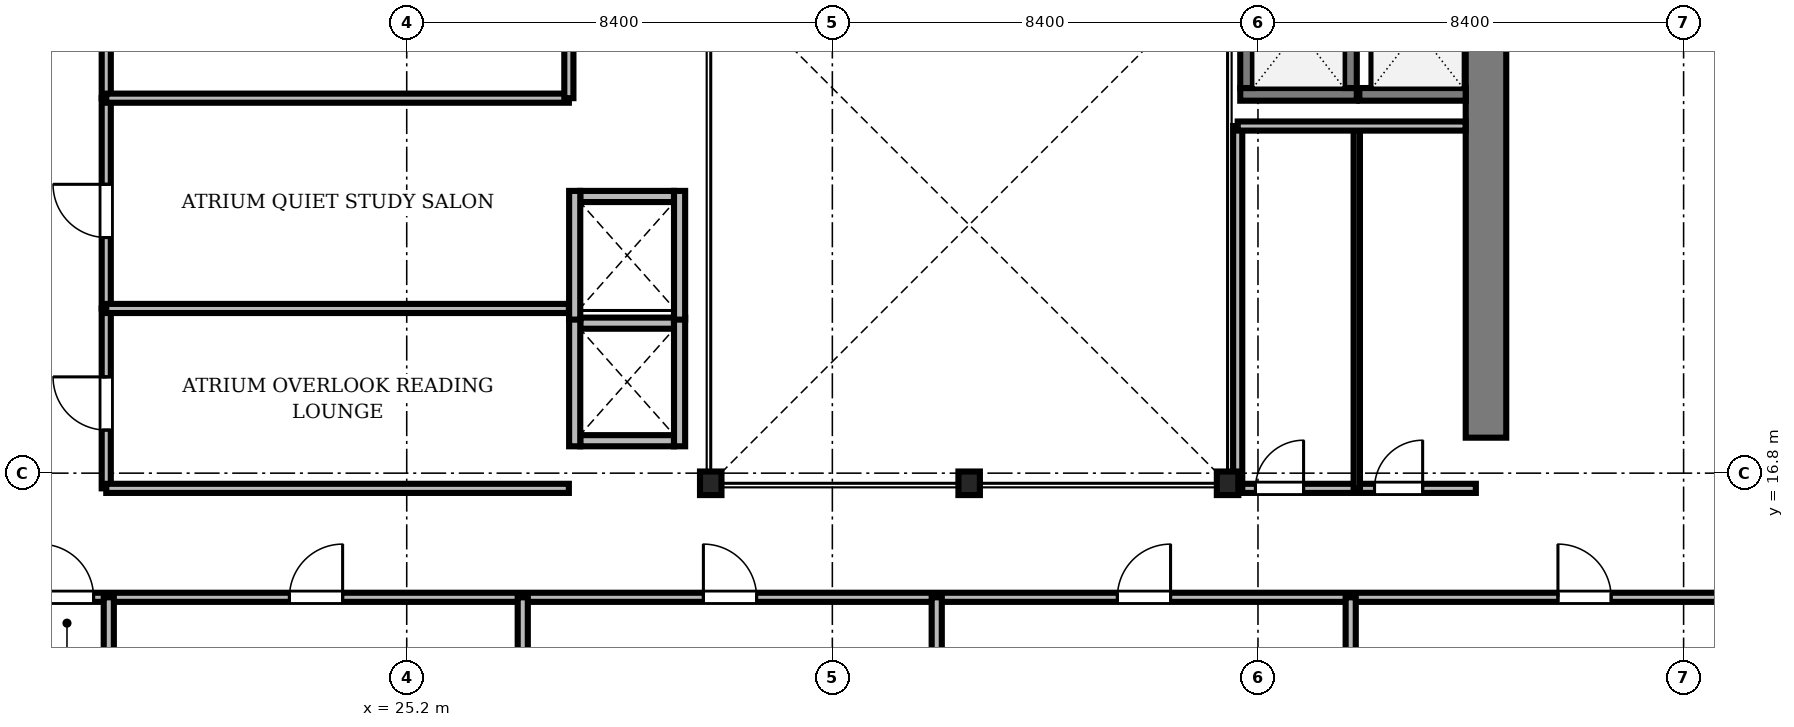
"""IFC4 building model, lengths in metres.
Left out: names, types, materials, properties, quantities, classifications, styles, units other than length and angle.
Written with IfcOpenShell. Run it as: python <this file> out.ifc"""

import sys

from ifc_helpers import new_model, si_unit, direction, frame, frame_2d, origin, origin_2d, place, context, subcontext, project, spatial, rectangle, i_section, extrude, source, transform, mapped, element, fill, save


model = new_model("IFC4")
c1 = context("Model", 3, precision=1e-05, world=origin(), true_north=direction((0.0, 1.0)))
c2 = subcontext(c1, "Body", "Model", "MODEL_VIEW")
j1 = project(units=[si_unit("LENGTHUNIT", "METRE"), si_unit("PLANEANGLEUNIT", "RADIAN")], contexts=[c1])
p1 = place(None, origin())
s1 = spatial("IfcSite", under=j1, at=p1, CompositionType="ELEMENT")
p2 = place(p1, origin())
s2 = spatial("IfcBuilding", under=s1, at=p2, CompositionType="ELEMENT")
p3 = place(p2, frame((0.0, 0.0, 159.4)))
s3 = spatial("IfcBuildingStorey", under=s2, at=p3, CompositionType="ELEMENT", Elevation=159.4)
m1 = source(origin(), c2, "Body", "SweptSolid", [
    extrude(rectangle(XDim=13.15, YDim=0.8, at=frame_2d((6.575, 0.0))), origin(), (0.0, 0.0, 1.0), 3.46),
])
p4 = place(p3, frame((46.5, 17.5, 0.0), z_axis=(0.0, 0.0, 1.0), x_axis=(0.0, 1.0, 0.0)))
e1 = element("IfcWall", 1, at=p4, inside=s3, PredefinedType="SHEAR", context=c2, shape_type="MappedRepresentation", body=[
    mapped(m1, transform((0.0, 0.0, 0.0), scale=1.0)),
])
m2 = source(origin(), c2, "Body", "SweptSolid", [
    extrude(i_section(OverallWidth=0.424, OverallDepth=0.465, WebThickness=0.035, FlangeThickness=0.056, FilletRadius=0.015, at=origin_2d()), origin(), (0.0, 0.0, 1.0), 3.46),
])
for number, where, z_axis, x_axis in (
    (2, (31.2, 16.6, 0.0), (0.0, 0.0, 1.0), (1.0, 0.0, 0.0)),
    (3, (36.3, 16.6, 0.0), (0.0, 0.0, 1.0), (1.0, 0.0, 0.0)),
    (4, (41.4, 16.6, 0.0), (0.0, 0.0, 1.0), (1.0, 0.0, 0.0)),
):
    element("IfcColumn", number, at=place(p3, frame(where, z_axis=z_axis, x_axis=x_axis)), inside=s3, PredefinedType="COLUMN", context=c2, shape_type="MappedRepresentation", body=[
        mapped(m2, transform((0.0, 0.0, 0.0), scale=1.0)),
    ])
m3 = source(origin(), c2, "Body", "SweptSolid", [
    extrude(rectangle(XDim=1.85, YDim=0.22, at=frame_2d((0.925, 0.0))), origin(), (0.0, 0.0, 1.0), 3.46),
])
for number, where, z_axis, x_axis in (
    (5, (28.625, 17.44, 0.0), (0.0, 0.0, 1.0), (1.0, 0.0, 0.0)),
    (6, (28.625, 19.76, 0.0), (0.0, 0.0, 1.0), (1.0, 0.0, 0.0)),
):
    element("IfcWall", number, at=place(p3, frame(where, z_axis=z_axis, x_axis=x_axis)), inside=s3, PredefinedType="SOLIDWALL", context=c2, shape_type="MappedRepresentation", body=[
        mapped(m3, transform((0.0, 0.0, 0.0), scale=1.0)),
    ])
m4 = source(origin(), c2, "Body", "SweptSolid", [
    extrude(rectangle(XDim=2.54, YDim=0.22, at=frame_2d((1.27, 0.0))), origin(), (0.0, 0.0, 1.0), 3.46),
])
for number, where, z_axis, x_axis in (
    (7, (28.515, 17.33, 0.0), (0.0, 0.0, 1.0), (0.0, 1.0, 0.0)),
    (8, (30.585, 17.33, 0.0), (0.0, 0.0, 1.0), (0.0, 1.0, 0.0)),
):
    element("IfcWall", number, at=place(p3, frame(where, z_axis=z_axis, x_axis=x_axis)), inside=s3, PredefinedType="SOLIDWALL", context=c2, shape_type="MappedRepresentation", body=[
        mapped(m4, transform((0.0, 0.0, 0.0), scale=1.0)),
    ])
p5 = place(p3, frame((28.625, 22.26, 0.0), z_axis=(0.0, 0.0, 1.0), x_axis=(1.0, 0.0, 0.0)))
e9 = element("IfcWall", 9, at=p5, inside=s3, PredefinedType="SOLIDWALL", context=c2, shape_type="MappedRepresentation", body=[
    mapped(m3, transform((0.0, 0.0, 0.0), scale=1.0)),
])
for number, where, z_axis, x_axis in (
    (10, (28.515, 19.83, 0.0), (0.0, 0.0, 1.0), (0.0, 1.0, 0.0)),
    (11, (30.585, 19.83, 0.0), (0.0, 0.0, 1.0), (0.0, 1.0, 0.0)),
):
    element("IfcWall", number, at=place(p3, frame(where, z_axis=z_axis, x_axis=x_axis)), inside=s3, PredefinedType="SOLIDWALL", context=c2, shape_type="MappedRepresentation", body=[
        mapped(m4, transform((0.0, 0.0, 0.0), scale=1.0)),
    ])
m5 = source(origin(), c2, "Body", "SweptSolid", [
    extrude(rectangle(XDim=2.3, YDim=0.25, at=frame_2d((1.15, 0.0))), origin(), (0.0, 0.0, 1.0), 3.46),
])
for number, where, z_axis, x_axis in (
    (12, (41.65, 24.275, 0.0), (0.0, 0.0, 1.0), (1.0, 0.0, 0.0)),
    (13, (41.775, 24.4, 0.0), (0.0, 0.0, 1.0), (0.0, 1.0, 0.0)),
    (14, (43.825, 24.4, 0.0), (0.0, 0.0, 1.0), (0.0, 1.0, 0.0)),
):
    element("IfcWall", number, at=place(p3, frame(where, z_axis=z_axis, x_axis=x_axis)), inside=s3, PredefinedType="SOLIDWALL", context=c2, shape_type="MappedRepresentation", body=[
        mapped(m5, transform((0.0, 0.0, 0.0), scale=1.0)),
    ])
m6 = source(origin(), c2, "Body", "SweptSolid", [
    extrude(rectangle(XDim=2.1, YDim=0.25, at=frame_2d((1.05, 0.0))), origin(), (0.0, 0.0, 1.0), 3.46),
])
p6 = place(p3, frame((44.0, 24.275, 0.0), z_axis=(0.0, 0.0, 1.0), x_axis=(1.0, 0.0, 0.0)))
e15 = element("IfcWall", 15, at=p6, inside=s3, PredefinedType="SOLIDWALL", context=c2, shape_type="MappedRepresentation", body=[
    mapped(m6, transform((0.0, 0.0, 0.0), scale=1.0)),
])
m7 = source(origin(), c2, "Body", "SweptSolid", [
    extrude(rectangle(XDim=46.156, YDim=0.18, at=frame_2d((23.078, 0.0))), origin(), (0.0, 0.0, 1.0), 2.702),
])
p7 = place(p3, frame((6.922, 14.35, 0.0), z_axis=(0.0, 0.0, 1.0), x_axis=(1.0, 0.0, 0.0)))
e16 = element("IfcWall", 16, at=p7, inside=s3, PredefinedType="PARTITIONING", context=c2, shape_type="MappedRepresentation", body=[
    mapped(m7, transform((0.0, 0.0, 0.0), scale=1.0)),
])
m8 = source(origin(), c2, "Body", "SweptSolid", [
    extrude(rectangle(XDim=1.05, YDim=2.2, at=frame_2d((0.525, 1.1))), frame((0.0, 0.1, 0.0), z_axis=(0.0, -1.0, 0.0), x_axis=(1.0, 0.0, 0.0)), (0.0, 0.0, 1.0), 0.2),
])
p8 = place(p7, frame((11.048, 0.0, 0.0)))
e17 = element("IfcOpeningElement", 17, at=p8, cuts=e16, PredefinedType="OPENING", context=c2, shape_type="MappedRepresentation", body=[
    mapped(m8, transform((0.0, 0.0, 0.0), scale=1.0)),
])
p9 = place(p7, frame((15.963, 0.0, 0.0)))
e18 = element("IfcOpeningElement", 18, at=p9, cuts=e16, PredefinedType="OPENING", context=c2, shape_type="MappedRepresentation", body=[
    mapped(m8, transform((0.0, 0.0, 0.0), scale=1.0)),
])
p10 = place(p7, frame((24.133, 0.0, 0.0)))
e19 = element("IfcOpeningElement", 19, at=p10, cuts=e16, PredefinedType="OPENING", context=c2, shape_type="MappedRepresentation", body=[
    mapped(m8, transform((0.0, 0.0, 0.0), scale=1.0)),
])
p11 = place(p7, frame((32.303, 0.0, 0.0)))
e20 = element("IfcOpeningElement", 20, at=p11, cuts=e16, PredefinedType="OPENING", context=c2, shape_type="MappedRepresentation", body=[
    mapped(m8, transform((0.0, 0.0, 0.0), scale=1.0)),
])
p12 = place(p7, frame((40.998, 0.0, 0.0)))
e21 = element("IfcOpeningElement", 21, at=p12, cuts=e16, PredefinedType="OPENING", context=c2, shape_type="MappedRepresentation", body=[
    mapped(m8, transform((0.0, 0.0, 0.0), scale=1.0)),
])
m9 = source(origin(), c2, "Body", "SweptSolid", [
    extrude(rectangle(XDim=4.7, YDim=0.18, at=frame_2d((2.35, 0.0))), origin(), (0.0, 0.0, 1.0), 2.852),
])
p13 = place(p3, frame((41.6, 16.5, 0.0), z_axis=(0.0, 0.0, 1.0), x_axis=(1.0, 0.0, 0.0)))
e22 = element("IfcWall", 22, at=p13, inside=s3, PredefinedType="PARTITIONING", context=c2, shape_type="MappedRepresentation", body=[
    mapped(m9, transform((0.0, 0.0, 0.0), scale=1.0)),
])
m10 = source(origin(), c2, "Body", "SweptSolid", [
    extrude(rectangle(XDim=0.95, YDim=2.15, at=frame_2d((0.475, 1.075))), frame((0.0, 0.1, 0.0), z_axis=(0.0, -1.0, 0.0), x_axis=(1.0, 0.0, 0.0)), (0.0, 0.0, 1.0), 0.2),
])
p14 = place(p13, frame((0.35, 0.0, 0.0)))
e23 = element("IfcOpeningElement", 23, at=p14, cuts=e22, PredefinedType="OPENING", context=c2, shape_type="MappedRepresentation", body=[
    mapped(m10, transform((0.0, 0.0, 0.0), scale=1.0)),
])
p15 = place(p13, frame((2.7, 0.0, 0.0)))
e24 = element("IfcOpeningElement", 24, at=p15, cuts=e22, PredefinedType="OPENING", context=c2, shape_type="MappedRepresentation", body=[
    mapped(m10, transform((0.0, 0.0, 0.0), scale=1.0)),
])
m11 = source(origin(), c2, "Body", "SweptSolid", [
    extrude(rectangle(XDim=4.24, YDim=0.18, at=frame_2d((2.12, 0.0))), origin(), (0.0, 0.0, 1.0), 2.852),
])
p16 = place(p3, frame((19.27, 24.2, 0.0), z_axis=(0.0, 0.0, 1.0), x_axis=(0.0, 1.0, 0.0)))
e25 = element("IfcWall", 25, at=p16, inside=s3, PredefinedType="PARTITIONING", context=c2, shape_type="MappedRepresentation", body=[
    mapped(m11, transform((0.0, 0.0, 0.0), scale=1.0)),
])
p17 = place(p16, frame((1.4, 0.0, 0.0)))
e26 = element("IfcOpeningElement", 26, at=p17, cuts=e25, PredefinedType="OPENING", context=c2, shape_type="MappedRepresentation", body=[
    mapped(m8, transform((0.0, 0.0, 0.0), scale=1.0)),
])
m12 = source(origin(), c2, "Body", "SweptSolid", [
    extrude(rectangle(XDim=4.15, YDim=0.18, at=frame_2d((2.075, 0.0))), origin(), (0.0, 0.0, 1.0), 3.122),
])
p18 = place(p3, frame((19.27, 20.05, 0.0), z_axis=(0.0, 0.0, 1.0), x_axis=(0.0, 1.0, 0.0)))
e27 = element("IfcWall", 27, at=p18, inside=s3, PredefinedType="PARTITIONING", context=c2, shape_type="MappedRepresentation", body=[
    mapped(m12, transform((0.0, 0.0, 0.0), scale=1.0)),
])
p19 = place(p18, frame((1.4, 0.0, 0.0)))
e28 = element("IfcOpeningElement", 28, at=p19, cuts=e27, PredefinedType="OPENING", context=c2, shape_type="MappedRepresentation", body=[
    mapped(m8, transform((0.0, 0.0, 0.0), scale=1.0)),
])
m13 = source(origin(), c2, "Body", "SweptSolid", [
    extrude(rectangle(XDim=3.55, YDim=0.18, at=frame_2d((1.775, 0.0))), origin(), (0.0, 0.0, 1.0), 2.852),
])
p20 = place(p3, frame((19.27, 16.5, 0.0), z_axis=(0.0, 0.0, 1.0), x_axis=(0.0, 1.0, 0.0)))
e29 = element("IfcWall", 29, at=p20, inside=s3, PredefinedType="PARTITIONING", context=c2, shape_type="MappedRepresentation", body=[
    mapped(m13, transform((0.0, 0.0, 0.0), scale=1.0)),
])
p21 = place(p20, frame((1.15, 0.0, 0.0)))
e30 = element("IfcOpeningElement", 30, at=p21, cuts=e29, PredefinedType="OPENING", context=c2, shape_type="MappedRepresentation", body=[
    mapped(m8, transform((0.0, 0.0, 0.0), scale=1.0)),
])
m14 = source(origin(), c2, "Body", "SweptSolid", [
    extrude(rectangle(XDim=12.228, YDim=0.2, at=frame_2d((6.114, 0.0))), origin(), (0.0, 0.0, 1.0), 2.702),
])
p22 = place(p3, frame((19.32, 2.122, 0.0), z_axis=(0.0, 0.0, 1.0), x_axis=(0.0, 1.0, 0.0)))
e31 = element("IfcWall", 31, at=p22, inside=s3, PredefinedType="PARTITIONING", context=c2, shape_type="MappedRepresentation", body=[
    mapped(m14, transform((0.0, 0.0, 0.0), scale=1.0)),
])
m15 = source(origin(), c2, "Body", "SweptSolid", [
    extrude(rectangle(XDim=12.42, YDim=0.2, at=frame_2d((6.21, 0.0))), origin(), (0.0, 0.0, 1.0), 2.702),
])
p23 = place(p3, frame((27.49, 1.93, 0.0), z_axis=(0.0, 0.0, 1.0), x_axis=(0.0, 1.0, 0.0)))
e32 = element("IfcWall", 32, at=p23, inside=s3, PredefinedType="PARTITIONING", context=c2, shape_type="MappedRepresentation", body=[
    mapped(m15, transform((0.0, 0.0, 0.0), scale=1.0)),
])
for number, where, z_axis, x_axis in (
    (33, (35.66, 2.122, 0.0), (0.0, 0.0, 1.0), (0.0, 1.0, 0.0)),
    (34, (43.83, 2.122, 0.0), (0.0, 0.0, 1.0), (0.0, 1.0, 0.0)),
):
    element("IfcWall", number, at=place(p3, frame(where, z_axis=z_axis, x_axis=x_axis)), inside=s3, PredefinedType="PARTITIONING", context=c2, shape_type="MappedRepresentation", body=[
        mapped(m14, transform((0.0, 0.0, 0.0), scale=1.0)),
    ])
m16 = source(origin(), c2, "Body", "SweptSolid", [
    extrude(rectangle(XDim=9.13, YDim=0.18, at=frame_2d((4.565, 0.0))), origin(), (0.0, 0.0, 1.0), 3.46),
])
for number, where, z_axis, x_axis in (
    (35, (19.27, 16.5, 0.0), (0.0, 0.0, 1.0), (1.0, 0.0, 0.0)),
    (36, (19.27, 20.05, 0.0), (0.0, 0.0, 1.0), (1.0, 0.0, 0.0)),
    (37, (19.27, 24.2, 0.0), (0.0, 0.0, 1.0), (1.0, 0.0, 0.0)),
):
    element("IfcWall", number, at=place(p3, frame(where, z_axis=z_axis, x_axis=x_axis)), inside=s3, PredefinedType="PARTITIONING", context=c2, shape_type="MappedRepresentation", body=[
        mapped(m16, transform((0.0, 0.0, 0.0), scale=1.0)),
    ])
m17 = source(origin(), c2, "Body", "SweptSolid", [
    extrude(rectangle(XDim=7.15, YDim=0.18, at=frame_2d((3.575, 0.0))), origin(), (0.0, 0.0, 1.0), 2.852),
])
p24 = place(p3, frame((41.6, 16.5, 0.0), z_axis=(0.0, 0.0, 1.0), x_axis=(0.0, 1.0, 0.0)))
e38 = element("IfcWall", 38, at=p24, inside=s3, PredefinedType="PARTITIONING", context=c2, shape_type="MappedRepresentation", body=[
    mapped(m17, transform((0.0, 0.0, 0.0), scale=1.0)),
])
m18 = source(origin(), c2, "Body", "SweptSolid", [
    extrude(rectangle(XDim=7.15, YDim=0.125, at=frame_2d((3.575, 0.0))), origin(), (0.0, 0.0, 1.0), 2.852),
])
p25 = place(p3, frame((43.95, 16.5, 0.0), z_axis=(0.0, 0.0, 1.0), x_axis=(0.0, 1.0, 0.0)))
e39 = element("IfcWall", 39, at=p25, inside=s3, PredefinedType="PARTITIONING", context=c2, shape_type="MappedRepresentation", body=[
    mapped(m18, transform((0.0, 0.0, 0.0), scale=1.0)),
])
m19 = source(origin(), c2, "Body", "SweptSolid", [
    extrude(rectangle(XDim=4.498, YDim=0.18, at=frame_2d((2.249, 0.0))), origin(), (0.0, 0.0, 1.0), 3.46),
])
p26 = place(p3, frame((41.6, 23.65, 0.0), z_axis=(0.0, 0.0, 1.0), x_axis=(1.0, 0.0, 0.0)))
e40 = element("IfcWall", 40, at=p26, inside=s3, PredefinedType="PARTITIONING", context=c2, shape_type="MappedRepresentation", body=[
    mapped(m19, transform((0.0, 0.0, 0.0), scale=1.0)),
])
p27 = place(p3, frame((28.4, 24.2, 0.0), z_axis=(0.0, 0.0, 1.0), x_axis=(0.0, 1.0, 0.0)))
e41 = element("IfcWall", 41, at=p27, inside=s3, PredefinedType="PARTITIONING", context=c2, shape_type="MappedRepresentation", body=[
    mapped(m11, transform((0.0, 0.0, 0.0), scale=1.0)),
])
m20 = source(origin(), c2, "Body", "SweptSolid", [
    extrude(rectangle(XDim=1.05, YDim=2.2, at=frame_2d((0.525, 1.1))), frame((0.0, 0.025, 0.0), z_axis=(0.0, -1.0, 0.0), x_axis=(1.0, 0.0, 0.0)), (0.0, 0.0, 1.0), 0.05),
])
p28 = place(p8, origin())
e42 = element("IfcDoor", 42, at=p28, inside=s3, OperationType="SINGLE_SWING_LEFT", PredefinedType="DOOR", context=c2, shape_type="MappedRepresentation", body=[
    mapped(m20, transform((0.0, 0.0, 0.0), scale=1.0)),
])
fill(e17, e42)
p29 = place(p9, origin())
e43 = element("IfcDoor", 43, at=p29, inside=s3, OperationType="SINGLE_SWING_RIGHT", PredefinedType="DOOR", context=c2, shape_type="MappedRepresentation", body=[
    mapped(m20, transform((0.0, 0.0, 0.0), scale=1.0)),
])
fill(e18, e43)
p30 = place(p10, origin())
e44 = element("IfcDoor", 44, at=p30, inside=s3, OperationType="SINGLE_SWING_LEFT", PredefinedType="DOOR", context=c2, shape_type="MappedRepresentation", body=[
    mapped(m20, transform((0.0, 0.0, 0.0), scale=1.0)),
])
fill(e19, e44)
p31 = place(p11, origin())
e45 = element("IfcDoor", 45, at=p31, inside=s3, OperationType="SINGLE_SWING_RIGHT", PredefinedType="DOOR", context=c2, shape_type="MappedRepresentation", body=[
    mapped(m20, transform((0.0, 0.0, 0.0), scale=1.0)),
])
fill(e20, e45)
p32 = place(p12, origin())
e46 = element("IfcDoor", 46, at=p32, inside=s3, OperationType="SINGLE_SWING_LEFT", PredefinedType="DOOR", context=c2, shape_type="MappedRepresentation", body=[
    mapped(m20, transform((0.0, 0.0, 0.0), scale=1.0)),
])
fill(e21, e46)
m21 = source(origin(), c2, "Body", "SweptSolid", [
    extrude(rectangle(XDim=0.95, YDim=2.15, at=frame_2d((0.475, 1.075))), frame((0.0, 0.025, 0.0), z_axis=(0.0, -1.0, 0.0), x_axis=(1.0, 0.0, 0.0)), (0.0, 0.0, 1.0), 0.05),
])
p33 = place(p14, origin())
e47 = element("IfcDoor", 47, at=p33, inside=s3, OperationType="SINGLE_SWING_RIGHT", PredefinedType="DOOR", context=c2, shape_type="MappedRepresentation", body=[
    mapped(m21, transform((0.0, 0.0, 0.0), scale=1.0)),
])
fill(e23, e47)
p34 = place(p15, origin())
e48 = element("IfcDoor", 48, at=p34, inside=s3, OperationType="SINGLE_SWING_RIGHT", PredefinedType="DOOR", context=c2, shape_type="MappedRepresentation", body=[
    mapped(m21, transform((0.0, 0.0, 0.0), scale=1.0)),
])
fill(e24, e48)
p35 = place(p19, origin())
e49 = element("IfcDoor", 49, at=p35, inside=s3, OperationType="SINGLE_SWING_RIGHT", PredefinedType="DOOR", context=c2, shape_type="MappedRepresentation", body=[
    mapped(m20, transform((0.0, 0.0, 0.0), scale=1.0)),
])
fill(e28, e49)
p36 = place(p21, origin())
e50 = element("IfcDoor", 50, at=p36, inside=s3, OperationType="SINGLE_SWING_RIGHT", PredefinedType="DOOR", context=c2, shape_type="MappedRepresentation", body=[
    mapped(m20, transform((0.0, 0.0, 0.0), scale=1.0)),
])
fill(e30, e50)
save(model, sys.argv[1])
